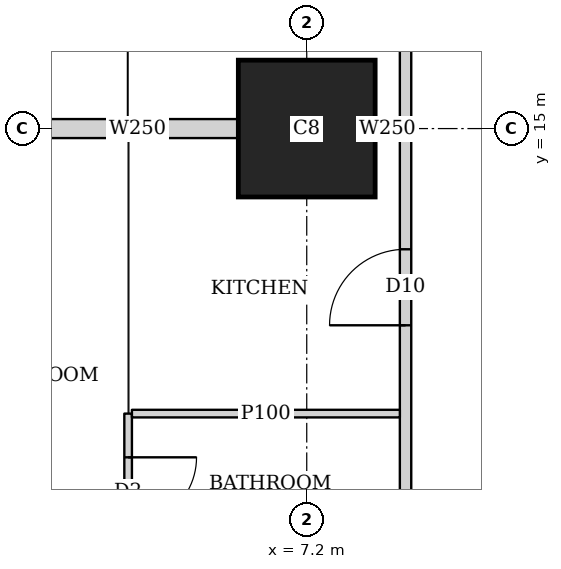
"""IFC4 building model, lengths in metres.
Left out: names, types, materials, properties, quantities, classifications, styles, units other than length and angle.
Written with IfcOpenShell. Run it as: python <this file> out.ifc"""

import sys

from ifc_helpers import new_model, si_unit, direction, frame, frame_2d, origin, origin_2d, place, context, subcontext, project, spatial, rectangle, extrude, element, fill, save


model = new_model("IFC4")
c1 = context("Model", 3, precision=1e-05, world=origin(), true_north=direction((0.0, 1.0)))
c2 = subcontext(c1, "Body", "Model", "MODEL_VIEW")
j1 = project(units=[si_unit("LENGTHUNIT", "METRE"), si_unit("PLANEANGLEUNIT", "RADIAN")], contexts=[c1])
p1 = place(None, origin())
s1 = spatial("IfcSite", under=j1, at=p1, CompositionType="ELEMENT")
p2 = place(p1, origin())
s2 = spatial("IfcBuilding", under=s1, at=p2, CompositionType="ELEMENT")
p3 = place(p2, frame((0.0, 0.0, 20.0)))
s3 = spatial("IfcBuildingStorey", under=s2, at=p3, CompositionType="ELEMENT", Elevation=20.0)
p4 = place(p3, frame((7.2, 15.0, 0.0), z_axis=(0.0, 0.0, 1.0), x_axis=(1.0, 0.0, 0.0)))
e1 = element("IfcColumn", 1, at=p4, inside=s3, PredefinedType="COLUMN", context=c2, shape_type="SweptSolid", body=[
    extrude(rectangle(XDim=1.8, YDim=1.8, at=origin_2d()), origin(), (0.0, 0.0, 1.0), 3.75),
])
p5 = place(p3, frame((8.5, 2.626, 0.0), z_axis=(0.0, 0.0, 1.0), x_axis=(0.0, 1.0, 0.0)))
e2 = element("IfcWall", 2, at=p5, inside=s3, PredefinedType="SOLIDWALL", context=c2, shape_type="SweptSolid", body=[
    extrude(rectangle(XDim=39.773, YDim=0.15, at=frame_2d((19.886, 0.0))), origin(), (0.0, 0.0, 1.0), 2.05),
])
p6 = place(p5, frame((9.786, 0.0, 0.0)))
e3 = element("IfcOpeningElement", 3, at=p6, cuts=e2, PredefinedType="OPENING", context=c2, shape_type="SweptSolid", body=[
    extrude(rectangle(XDim=1.0, YDim=2.0, at=frame_2d((0.5, 1.0))), frame((0.0, 0.085, 0.0), z_axis=(0.0, -1.0, 0.0), x_axis=(1.0, 0.0, 0.0)), (0.0, 0.0, 1.0), 0.17),
])
p7 = place(p5, frame((13.961, 0.0, 0.0)))
e4 = element("IfcOpeningElement", 4, at=p7, cuts=e2, PredefinedType="OPENING", context=c2, shape_type="SweptSolid", body=[
    extrude(rectangle(XDim=1.0, YDim=2.0, at=frame_2d((0.5, 1.0))), frame((0.0, 0.085, 0.0), z_axis=(0.0, -1.0, 0.0), x_axis=(1.0, 0.0, 0.0)), (0.0, 0.0, 1.0), 0.17),
])
p8 = place(p5, frame((24.787, 0.0, 0.0)))
e5 = element("IfcOpeningElement", 5, at=p8, cuts=e2, PredefinedType="OPENING", context=c2, shape_type="SweptSolid", body=[
    extrude(rectangle(XDim=1.0, YDim=2.0, at=frame_2d((0.5, 1.0))), frame((0.0, 0.085, 0.0), z_axis=(0.0, -1.0, 0.0), x_axis=(1.0, 0.0, 0.0)), (0.0, 0.0, 1.0), 0.17),
])
p9 = place(p5, frame((32.287, 0.0, 0.0)))
e6 = element("IfcOpeningElement", 6, at=p9, cuts=e2, PredefinedType="OPENING", context=c2, shape_type="SweptSolid", body=[
    extrude(rectangle(XDim=1.0, YDim=2.0, at=frame_2d((0.5, 1.0))), frame((0.0, 0.085, 0.0), z_axis=(0.0, -1.0, 0.0), x_axis=(1.0, 0.0, 0.0)), (0.0, 0.0, 1.0), 0.17),
])
p10 = place(p3, frame((4.85, 2.299, 0.0), z_axis=(0.0, 0.0, 1.0), x_axis=(0.0, 1.0, 0.0)))
e7 = element("IfcWall", 7, at=p10, inside=s3, PredefinedType="PARTITIONING", context=c2, shape_type="SweptSolid", body=[
    extrude(rectangle(XDim=8.951, YDim=0.1, at=frame_2d((4.476, 0.0))), origin(), (0.0, 0.0, 1.0), 3.5),
])
p11 = place(p10, frame((7.476, 0.0, 0.0)))
e8 = element("IfcOpeningElement", 8, at=p11, cuts=e7, PredefinedType="OPENING", context=c2, shape_type="SweptSolid", body=[
    extrude(rectangle(XDim=0.9, YDim=2.1, at=frame_2d((0.45, 1.05))), frame((0.0, 0.06, 0.0), z_axis=(0.0, -1.0, 0.0), x_axis=(1.0, 0.0, 0.0)), (0.0, 0.0, 1.0), 0.12),
])
p12 = place(p10, frame((3.831, 0.0, 0.0)))
e9 = element("IfcOpeningElement", 9, at=p12, cuts=e7, PredefinedType="OPENING", context=c2, shape_type="SweptSolid", body=[
    extrude(rectangle(XDim=0.9, YDim=2.1, at=frame_2d((0.45, 1.05))), frame((0.0, 0.06, 0.0), z_axis=(0.0, -1.0, 0.0), x_axis=(1.0, 0.0, 0.0)), (0.0, 0.0, 1.0), 0.12),
])
p13 = place(p10, frame((5.601, 0.0, 0.0)))
e10 = element("IfcOpeningElement", 10, at=p13, cuts=e7, PredefinedType="OPENING", context=c2, shape_type="SweptSolid", body=[
    extrude(rectangle(XDim=0.9, YDim=2.1, at=frame_2d((0.45, 1.05))), frame((0.0, 0.06, 0.0), z_axis=(0.0, -1.0, 0.0), x_axis=(1.0, 0.0, 0.0)), (0.0, 0.0, 1.0), 0.12),
])
p14 = place(p10, frame((1.6, 0.0, 0.0)))
e11 = element("IfcOpeningElement", 11, at=p14, cuts=e7, PredefinedType="OPENING", context=c2, shape_type="SweptSolid", body=[
    extrude(rectangle(XDim=0.9, YDim=2.1, at=frame_2d((0.45, 1.05))), frame((0.0, 0.06, 0.0), z_axis=(0.0, -1.0, 0.0), x_axis=(1.0, 0.0, 0.0)), (0.0, 0.0, 1.0), 0.12),
])
p15 = place(p3, frame((4.9, 11.25, 0.0), z_axis=(0.0, 0.0, 1.0), x_axis=(1.0, 0.0, 0.0)))
e12 = element("IfcWall", 12, at=p15, inside=s3, PredefinedType="PARTITIONING", context=c2, shape_type="SweptSolid", body=[
    extrude(rectangle(XDim=3.525, YDim=0.1, at=frame_2d((1.763, 0.0))), origin(), (0.0, 0.0, 1.0), 3.5),
])
p16 = place(p3, frame((3.65, 15.0, 0.0), z_axis=(0.0, 0.0, 1.0), x_axis=(1.0, 0.0, 0.0)))
e13 = element("IfcWall", 13, at=p16, inside=s3, PredefinedType="SOLIDWALL", context=c2, shape_type="SweptSolid", body=[
    extrude(rectangle(XDim=2.649, YDim=0.25, at=frame_2d((1.325, 0.0))), origin(), (0.0, 0.0, 1.0), 3.5),
])
p17 = place(p3, frame((8.101, 15.0, 0.0), z_axis=(0.0, 0.0, 1.0), x_axis=(1.0, 0.0, 0.0)))
e14 = element("IfcWall", 14, at=p17, inside=s3, PredefinedType="SOLIDWALL", context=c2, shape_type="SweptSolid", body=[
    extrude(rectangle(XDim=0.324, YDim=0.25, at=frame_2d((0.162, 0.0))), origin(), (0.0, 0.0, 1.0), 3.5),
])
p18 = place(p11, origin())
e15 = element("IfcDoor", 15, at=p18, inside=s3, OperationType="SINGLE_SWING_LEFT", PredefinedType="DOOR", context=c2, shape_type="SweptSolid", body=[
    extrude(rectangle(XDim=0.9, YDim=2.1, at=frame_2d((0.45, 1.05))), frame((0.0, 0.025, 0.0), z_axis=(0.0, -1.0, 0.0), x_axis=(1.0, 0.0, 0.0)), (0.0, 0.0, 1.0), 0.05),
])
fill(e8, e15)
p19 = place(p6, origin())
e16 = element("IfcDoor", 16, at=p19, inside=s3, OperationType="SINGLE_SWING_LEFT", PredefinedType="DOOR", context=c2, shape_type="SweptSolid", body=[
    extrude(rectangle(XDim=1.0, YDim=2.0, at=frame_2d((0.5, 1.0))), frame((0.0, 0.025, 0.0), z_axis=(0.0, -1.0, 0.0), x_axis=(1.0, 0.0, 0.0)), (0.0, 0.0, 1.0), 0.05),
])
fill(e3, e16)
save(model, sys.argv[1])
